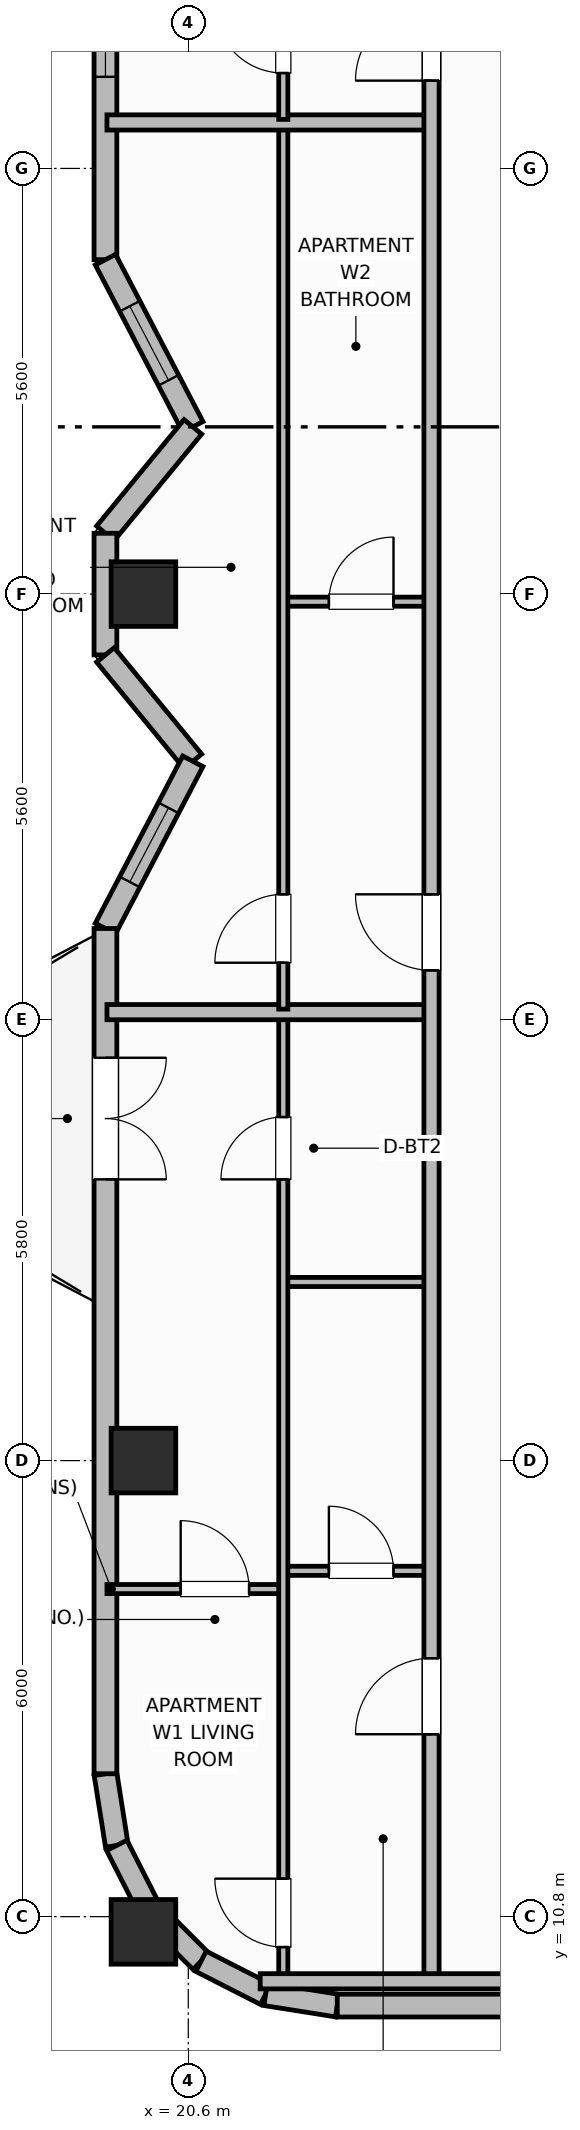
"""IFC4 building model, lengths in metres.
Left out: names, types, materials, properties, quantities, classifications, styles, units other than length and angle.
Written with IfcOpenShell. Run it as: python <this file> out.ifc"""

import sys

from ifc_helpers import new_model, si_unit, direction, frame, frame_2d, origin, origin_2d, place, context, subcontext, project, spatial, rectangle, extrude, element, fill, save


model = new_model("IFC4")
c1 = context("Model", 3, precision=1e-05, world=origin(), true_north=direction((0.0, 1.0)))
c2 = subcontext(c1, "Body", "Model", "MODEL_VIEW")
j1 = project(units=[si_unit("LENGTHUNIT", "METRE"), si_unit("PLANEANGLEUNIT", "RADIAN")], contexts=[c1])
p1 = place(None, origin())
s1 = spatial("IfcSite", under=j1, at=p1, CompositionType="ELEMENT")
p2 = place(p1, origin())
s2 = spatial("IfcBuilding", under=s1, at=p2, CompositionType="ELEMENT")
p3 = place(p2, frame((0.0, 0.0, 240.6)))
s3 = spatial("IfcBuildingStorey", under=s2, at=p3, CompositionType="ELEMENT", Elevation=240.6)
for number, where, z_axis, x_axis in (
    (1, (20.01, 10.6, 0.0), (0.0, 0.0, 1.0), (1.0, 0.0, 0.0)),
    (2, (20.01, 16.8, 0.0), (0.0, 0.0, 1.0), (1.0, 0.0, 0.0)),
    (3, (20.01, 28.2, 0.0), (0.0, 0.0, 1.0), (1.0, 0.0, 0.0)),
):
    element("IfcColumn", number, at=place(p3, frame(where, z_axis=z_axis, x_axis=x_axis)), inside=s3, PredefinedType="COLUMN", context=c2, shape_type="SweptSolid", body=[
        extrude(rectangle(XDim=0.85, YDim=0.85, at=origin_2d()), origin(), (0.0, 0.0, 1.0), 3.7),
    ])
p4 = place(p3, frame((19.51, 12.68, 0.0), z_axis=(0.0, 0.0, 1.0), x_axis=(0.156343617883, -0.987702725088, 0.0)))
e4 = element("IfcWall", 4, at=p4, inside=s3, PredefinedType="SOLIDWALL", context=c2, shape_type="SweptSolid", body=[
    extrude(rectangle(XDim=0.954, YDim=0.3, at=frame_2d((0.477, 0.0))), origin(), (0.0, 0.0, 1.0), 2.73),
])
for number, where, z_axis, x_axis in (
    (5, (19.659, 11.738, 0.0), (0.0, 0.0, 1.0), (0.454, -0.891, 0.0)),
    (6, (20.093, 10.887, 0.0), (0.0, 0.0, 1.0), (0.707, -0.707, 0.0)),
):
    element("IfcWall", number, at=place(p3, frame(where, z_axis=z_axis, x_axis=x_axis)), inside=s3, PredefinedType="SOLIDWALL", context=c2, shape_type="SweptSolid", body=[
        extrude(rectangle(XDim=0.954, YDim=0.3, at=frame_2d((0.477, 0.0))), origin(), (0.0, 0.0, 1.0), 2.73),
    ])
p5 = place(p3, frame((20.767, 10.212, 0.0), z_axis=(0.0, 0.0, 1.0), x_axis=(0.891023873617, -0.45395644796, 0.0)))
e7 = element("IfcWall", 7, at=p5, inside=s3, PredefinedType="SOLIDWALL", context=c2, shape_type="SweptSolid", body=[
    extrude(rectangle(XDim=0.954, YDim=0.3, at=frame_2d((0.477, 0.0))), origin(), (0.0, 0.0, 1.0), 2.73),
])
p6 = place(p3, frame((21.617, 9.779, 0.0), z_axis=(0.0, 0.0, 1.0), x_axis=(0.987669453596, -0.156553666304, 0.0)))
e8 = element("IfcWall", 8, at=p6, inside=s3, PredefinedType="SOLIDWALL", context=c2, shape_type="SweptSolid", body=[
    extrude(rectangle(XDim=0.954, YDim=0.3, at=frame_2d((0.477, 0.0))), origin(), (0.0, 0.0, 1.0), 2.73),
])
p7 = place(p3, frame((22.56, 9.63, 0.0), z_axis=(0.0, 0.0, 1.0), x_axis=(1.0, 0.0, 0.0)))
e9 = element("IfcWall", 9, at=p7, inside=s3, PredefinedType="SOLIDWALL", context=c2, shape_type="SweptSolid", body=[
    extrude(rectangle(XDim=33.28, YDim=0.3, at=frame_2d((16.64, 0.0))), origin(), (0.0, 0.0, 1.0), 2.73),
])
p8 = place(p7, frame((5.08, 0.0, 0.76)))
e10 = element("IfcOpeningElement", 10, at=p8, cuts=e9, PredefinedType="OPENING", context=c2, shape_type="SweptSolid", body=[
    extrude(rectangle(XDim=1.8, YDim=1.85, at=frame_2d((0.9, 0.925))), frame((0.0, 0.16, 0.0), z_axis=(0.0, -1.0, 0.0), x_axis=(1.0, 0.0, 0.0)), (0.0, 0.0, 1.0), 0.32),
])
p9 = place(p7, frame((8.633, 0.0, 0.76)))
e11 = element("IfcOpeningElement", 11, at=p9, cuts=e9, PredefinedType="OPENING", context=c2, shape_type="SweptSolid", body=[
    extrude(rectangle(XDim=1.8, YDim=1.85, at=frame_2d((0.9, 0.925))), frame((0.0, 0.16, 0.0), z_axis=(0.0, -1.0, 0.0), x_axis=(1.0, 0.0, 0.0)), (0.0, 0.0, 1.0), 0.32),
])
p10 = place(p7, frame((15.74, 0.0, 0.76)))
e12 = element("IfcOpeningElement", 12, at=p10, cuts=e9, PredefinedType="OPENING", context=c2, shape_type="SweptSolid", body=[
    extrude(rectangle(XDim=1.8, YDim=1.85, at=frame_2d((0.9, 0.925))), frame((0.0, 0.16, 0.0), z_axis=(0.0, -1.0, 0.0), x_axis=(1.0, 0.0, 0.0)), (0.0, 0.0, 1.0), 0.32),
])
p11 = place(p7, frame((22.847, 0.0, 0.76)))
e13 = element("IfcOpeningElement", 13, at=p11, cuts=e9, PredefinedType="OPENING", context=c2, shape_type="SweptSolid", body=[
    extrude(rectangle(XDim=1.8, YDim=1.85, at=frame_2d((0.9, 0.925))), frame((0.0, 0.16, 0.0), z_axis=(0.0, -1.0, 0.0), x_axis=(1.0, 0.0, 0.0)), (0.0, 0.0, 1.0), 0.32),
])
p12 = place(p7, frame((26.4, 0.0, 0.76)))
e14 = element("IfcOpeningElement", 14, at=p12, cuts=e9, PredefinedType="OPENING", context=c2, shape_type="SweptSolid", body=[
    extrude(rectangle(XDim=1.8, YDim=1.85, at=frame_2d((0.9, 0.925))), frame((0.0, 0.16, 0.0), z_axis=(0.0, -1.0, 0.0), x_axis=(1.0, 0.0, 0.0)), (0.0, 0.0, 1.0), 0.32),
])
p13 = place(p3, frame((19.51, 43.72, 0.0), z_axis=(0.0, 0.0, 1.0), x_axis=(0.0, -1.0, 0.0)))
e15 = element("IfcWall", 15, at=p13, inside=s3, PredefinedType="SOLIDWALL", context=c2, shape_type="SweptSolid", body=[
    extrude(rectangle(XDim=11.12, YDim=0.3, at=frame_2d((5.56, 0.0))), origin(), (0.0, 0.0, 1.0), 2.73),
])
p14 = place(p13, frame((0.16, 0.0, 0.72)))
e16 = element("IfcOpeningElement", 16, at=p14, cuts=e15, PredefinedType="OPENING", context=c2, shape_type="SweptSolid", body=[
    extrude(rectangle(XDim=1.4, YDim=1.85, at=frame_2d((0.7, 0.925))), frame((0.0, 0.16, 0.0), z_axis=(0.0, -1.0, 0.0), x_axis=(1.0, 0.0, 0.0)), (0.0, 0.0, 1.0), 0.32),
])
p15 = place(p13, frame((6.615, 0.0, 0.71)))
e17 = element("IfcOpeningElement", 17, at=p15, cuts=e15, PredefinedType="OPENING", context=c2, shape_type="SweptSolid", body=[
    extrude(rectangle(XDim=2.1, YDim=1.9, at=frame_2d((1.05, 0.95))), frame((0.0, 0.16, 0.0), z_axis=(0.0, -1.0, 0.0), x_axis=(1.0, 0.0, 0.0)), (0.0, 0.0, 1.0), 0.32),
])
p16 = place(p3, frame((19.51, 32.6, 0.0), z_axis=(0.0, 0.0, 1.0), x_axis=(0.463191013929, -0.88625847506, 0.0)))
e18 = element("IfcWall", 18, at=p16, inside=s3, PredefinedType="SOLIDWALL", context=c2, shape_type="SweptSolid", body=[
    extrude(rectangle(XDim=2.483, YDim=0.3, at=frame_2d((1.241, 0.0))), origin(), (0.0, 0.0, 1.0), 2.73),
])
p17 = place(p16, frame((0.691, 0.0, 0.92)))
e19 = element("IfcOpeningElement", 19, at=p17, cuts=e18, PredefinedType="OPENING", context=c2, shape_type="SweptSolid", body=[
    extrude(rectangle(XDim=1.1, YDim=1.65, at=frame_2d((0.55, 0.825))), frame((0.0, 0.16, 0.0), z_axis=(0.0, -1.0, 0.0), x_axis=(1.0, 0.0, 0.0)), (0.0, 0.0, 1.0), 0.32),
])
p18 = place(p3, frame((20.66, 30.4, 0.0), z_axis=(0.0, 0.0, 1.0), x_axis=(-0.634733675645, -0.772730975827, 0.0)))
e20 = element("IfcWall", 20, at=p18, inside=s3, PredefinedType="SOLIDWALL", context=c2, shape_type="SweptSolid", body=[
    extrude(rectangle(XDim=1.812, YDim=0.3, at=frame_2d((0.906, 0.0))), origin(), (0.0, 0.0, 1.0), 2.73),
])
p19 = place(p3, frame((19.51, 29.0, 0.0), z_axis=(0.0, 0.0, 1.0), x_axis=(0.0, -1.0, 0.0)))
e21 = element("IfcWall", 21, at=p19, inside=s3, PredefinedType="SOLIDWALL", context=c2, shape_type="SweptSolid", body=[
    extrude(rectangle(XDim=1.6, YDim=0.3, at=frame_2d((0.8, 0.0))), origin(), (0.0, 0.0, 1.0), 2.73),
])
p20 = place(p3, frame((19.51, 27.4, 0.0), z_axis=(0.0, 0.0, 1.0), x_axis=(0.634733675645, -0.772730975827, 0.0)))
e22 = element("IfcWall", 22, at=p20, inside=s3, PredefinedType="SOLIDWALL", context=c2, shape_type="SweptSolid", body=[
    extrude(rectangle(XDim=1.812, YDim=0.3, at=frame_2d((0.906, 0.0))), origin(), (0.0, 0.0, 1.0), 2.73),
])
p21 = place(p3, frame((20.66, 26.0, 0.0), z_axis=(0.0, 0.0, 1.0), x_axis=(-0.46323138706, -0.886237373418, 0.0)))
e23 = element("IfcWall", 23, at=p21, inside=s3, PredefinedType="SOLIDWALL", context=c2, shape_type="SweptSolid", body=[
    extrude(rectangle(XDim=2.482, YDim=0.3, at=frame_2d((1.241, 0.0))), origin(), (0.0, 0.0, 1.0), 2.73),
])
p22 = place(p21, frame((0.691, 0.0, 0.92)))
e24 = element("IfcOpeningElement", 24, at=p22, cuts=e23, PredefinedType="OPENING", context=c2, shape_type="SweptSolid", body=[
    extrude(rectangle(XDim=1.1, YDim=1.65, at=frame_2d((0.55, 0.825))), frame((0.0, 0.16, 0.0), z_axis=(0.0, -1.0, 0.0), x_axis=(1.0, 0.0, 0.0)), (0.0, 0.0, 1.0), 0.32),
])
p23 = place(p3, frame((19.51, 23.8, 0.0), z_axis=(0.0, 0.0, 1.0), x_axis=(0.0, -1.0, 0.0)))
e25 = element("IfcWall", 25, at=p23, inside=s3, PredefinedType="SOLIDWALL", context=c2, shape_type="SweptSolid", body=[
    extrude(rectangle(XDim=11.12, YDim=0.3, at=frame_2d((5.56, 0.0))), origin(), (0.0, 0.0, 1.0), 2.73),
])
p24 = place(p23, frame((1.7, 0.0, 0.0)))
e26 = element("IfcOpeningElement", 26, at=p24, cuts=e25, PredefinedType="OPENING", context=c2, shape_type="SweptSolid", body=[
    extrude(rectangle(XDim=1.6, YDim=2.1, at=frame_2d((0.8, 1.05))), frame((0.0, 0.16, 0.0), z_axis=(0.0, -1.0, 0.0), x_axis=(1.0, 0.0, 0.0)), (0.0, 0.0, 1.0), 0.32),
])
p25 = place(p3, frame((21.85, 15.35, 0.0), z_axis=(0.0, 0.0, 1.0), x_axis=(1.0, 0.0, 0.0)))
e27 = element("IfcWall", 27, at=p25, inside=s3, PredefinedType="PARTITIONING", context=c2, shape_type="SweptSolid", body=[
    extrude(rectangle(XDim=1.95, YDim=0.12, at=frame_2d((0.975, 0.0))), origin(), (0.0, 0.0, 1.0), 2.56),
])
p26 = place(p25, frame((0.6, 0.0, 0.0)))
e28 = element("IfcOpeningElement", 28, at=p26, cuts=e27, PredefinedType="OPENING", context=c2, shape_type="SweptSolid", body=[
    extrude(rectangle(XDim=0.85, YDim=2.1, at=frame_2d((0.425, 1.05))), frame((0.0, 0.07, 0.0), z_axis=(0.0, -1.0, 0.0), x_axis=(1.0, 0.0, 0.0)), (0.0, 0.0, 1.0), 0.14),
])
p27 = place(p3, frame((21.85, 19.15, 0.0), z_axis=(0.0, 0.0, 1.0), x_axis=(1.0, 0.0, 0.0)))
e29 = element("IfcWall", 29, at=p27, inside=s3, PredefinedType="PARTITIONING", context=c2, shape_type="SweptSolid", body=[
    extrude(rectangle(XDim=1.95, YDim=0.12, at=frame_2d((0.975, 0.0))), origin(), (0.0, 0.0, 1.0), 2.56),
])
p28 = place(p3, frame((19.53, 15.11, 0.0), z_axis=(0.0, 0.0, 1.0), x_axis=(1.0, 0.0, 0.0)))
e30 = element("IfcWall", 30, at=p28, inside=s3, PredefinedType="PARTITIONING", context=c2, shape_type="SweptSolid", body=[
    extrude(rectangle(XDim=2.32, YDim=0.12, at=frame_2d((1.16, 0.0))), origin(), (0.0, 0.0, 1.0), 2.56),
])
p29 = place(p28, frame((0.97, 0.0, 0.0)))
e31 = element("IfcOpeningElement", 31, at=p29, cuts=e30, PredefinedType="OPENING", context=c2, shape_type="SweptSolid", body=[
    extrude(rectangle(XDim=0.9, YDim=2.1, at=frame_2d((0.45, 1.05))), frame((0.0, 0.07, 0.0), z_axis=(0.0, -1.0, 0.0), x_axis=(1.0, 0.0, 0.0)), (0.0, 0.0, 1.0), 0.14),
])
p30 = place(p3, frame((21.85, 9.99, 0.0), z_axis=(0.0, 0.0, 1.0), x_axis=(0.0, 1.0, 0.0)))
e32 = element("IfcWall", 32, at=p30, inside=s3, PredefinedType="PARTITIONING", context=c2, shape_type="SweptSolid", body=[
    extrude(rectangle(XDim=12.67, YDim=0.12, at=frame_2d((6.335, 0.0))), origin(), (0.0, 0.0, 1.0), 2.56),
])
p31 = place(p30, frame((0.41, 0.0, 0.0)))
e33 = element("IfcOpeningElement", 33, at=p31, cuts=e32, PredefinedType="OPENING", context=c2, shape_type="SweptSolid", body=[
    extrude(rectangle(XDim=0.9, YDim=2.1, at=frame_2d((0.45, 1.05))), frame((0.0, 0.07, 0.0), z_axis=(0.0, -1.0, 0.0), x_axis=(1.0, 0.0, 0.0)), (0.0, 0.0, 1.0), 0.14),
])
p32 = place(p30, frame((10.51, 0.0, 0.0)))
e34 = element("IfcOpeningElement", 34, at=p32, cuts=e32, PredefinedType="OPENING", context=c2, shape_type="SweptSolid", body=[
    extrude(rectangle(XDim=0.82, YDim=2.08, at=frame_2d((0.41, 1.04))), frame((0.0, 0.07, 0.0), z_axis=(0.0, -1.0, 0.0), x_axis=(1.0, 0.0, 0.0)), (0.0, 0.0, 1.0), 0.14),
])
p33 = place(p3, frame((19.53, 22.7, 0.0), z_axis=(0.0, 0.0, 1.0), x_axis=(1.0, 0.0, 0.0)))
e35 = element("IfcWall", 35, at=p33, inside=s3, PredefinedType="PARTITIONING", context=c2, shape_type="SweptSolid", body=[
    extrude(rectangle(XDim=4.27, YDim=0.2, at=frame_2d((2.135, 0.0))), origin(), (0.0, 0.0, 1.0), 2.56),
])
p34 = place(p3, frame((21.85, 28.1, 0.0), z_axis=(0.0, 0.0, 1.0), x_axis=(1.0, 0.0, 0.0)))
e36 = element("IfcWall", 36, at=p34, inside=s3, PredefinedType="PARTITIONING", context=c2, shape_type="SweptSolid", body=[
    extrude(rectangle(XDim=1.95, YDim=0.12, at=frame_2d((0.975, 0.0))), origin(), (0.0, 0.0, 1.0), 2.56),
])
p35 = place(p34, frame((0.6, 0.0, 0.0)))
e37 = element("IfcOpeningElement", 37, at=p35, cuts=e36, PredefinedType="OPENING", context=c2, shape_type="SweptSolid", body=[
    extrude(rectangle(XDim=0.85, YDim=2.1, at=frame_2d((0.425, 1.05))), frame((0.0, 0.07, 0.0), z_axis=(0.0, -1.0, 0.0), x_axis=(1.0, 0.0, 0.0)), (0.0, 0.0, 1.0), 0.14),
])
p36 = place(p3, frame((21.85, 22.74, 0.0), z_axis=(0.0, 0.0, 1.0), x_axis=(0.0, 1.0, 0.0)))
e38 = element("IfcWall", 38, at=p36, inside=s3, PredefinedType="PARTITIONING", context=c2, shape_type="SweptSolid", body=[
    extrude(rectangle(XDim=11.625, YDim=0.12, at=frame_2d((5.812, 0.0))), origin(), (0.0, 0.0, 1.0), 2.56),
])
p37 = place(p36, frame((0.61, 0.0, 0.0)))
e39 = element("IfcOpeningElement", 39, at=p37, cuts=e38, PredefinedType="OPENING", context=c2, shape_type="SweptSolid", body=[
    extrude(rectangle(XDim=0.9, YDim=2.1, at=frame_2d((0.45, 1.05))), frame((0.0, 0.07, 0.0), z_axis=(0.0, -1.0, 0.0), x_axis=(1.0, 0.0, 0.0)), (0.0, 0.0, 1.0), 0.14),
])
p38 = place(p3, frame((19.53, 34.405, 0.0), z_axis=(0.0, 0.0, 1.0), x_axis=(1.0, 0.0, 0.0)))
e40 = element("IfcWall", 40, at=p38, inside=s3, PredefinedType="PARTITIONING", context=c2, shape_type="SweptSolid", body=[
    extrude(rectangle(XDim=4.27, YDim=0.2, at=frame_2d((2.135, 0.0))), origin(), (0.0, 0.0, 1.0), 2.56),
])
p39 = place(p3, frame((21.85, 34.445, 0.0), z_axis=(0.0, 0.0, 1.0), x_axis=(0.0, 1.0, 0.0)))
e41 = element("IfcWall", 41, at=p39, inside=s3, PredefinedType="PARTITIONING", context=c2, shape_type="SweptSolid", body=[
    extrude(rectangle(XDim=11.965, YDim=0.12, at=frame_2d((5.982, 0.0))), origin(), (0.0, 0.0, 1.0), 2.56),
])
p40 = place(p39, frame((0.61, 0.0, 0.0)))
e42 = element("IfcOpeningElement", 42, at=p40, cuts=e41, PredefinedType="OPENING", context=c2, shape_type="SweptSolid", body=[
    extrude(rectangle(XDim=0.9, YDim=2.1, at=frame_2d((0.45, 1.05))), frame((0.0, 0.07, 0.0), z_axis=(0.0, -1.0, 0.0), x_axis=(1.0, 0.0, 0.0)), (0.0, 0.0, 1.0), 0.14),
])
p41 = place(p39, frame((10.157, 0.0, 0.0)))
e43 = element("IfcOpeningElement", 43, at=p41, cuts=e41, PredefinedType="OPENING", context=c2, shape_type="SweptSolid", body=[
    extrude(rectangle(XDim=0.82, YDim=2.08, at=frame_2d((0.41, 1.04))), frame((0.0, 0.07, 0.0), z_axis=(0.0, -1.0, 0.0), x_axis=(1.0, 0.0, 0.0)), (0.0, 0.0, 1.0), 0.14),
])
p42 = place(p3, frame((23.8, 9.95, 0.0), z_axis=(0.0, 0.0, 1.0), x_axis=(0.0, 1.0, 0.0)))
e44 = element("IfcWall", 44, at=p42, inside=s3, PredefinedType="PARTITIONING", context=c2, shape_type="SweptSolid", body=[
    extrude(rectangle(XDim=36.5, YDim=0.2, at=frame_2d((18.25, 0.0))), origin(), (0.0, 0.0, 1.0), 2.56),
])
p43 = place(p42, frame((3.25, 0.0, 0.0)))
e45 = element("IfcOpeningElement", 45, at=p43, cuts=e44, PredefinedType="OPENING", context=c2, shape_type="SweptSolid", body=[
    extrude(rectangle(XDim=1.0, YDim=2.15, at=frame_2d((0.5, 1.075))), frame((0.0, 0.11, 0.0), z_axis=(0.0, -1.0, 0.0), x_axis=(1.0, 0.0, 0.0)), (0.0, 0.0, 1.0), 0.22),
])
p44 = place(p42, frame((13.3, 0.0, 0.0)))
e46 = element("IfcOpeningElement", 46, at=p44, cuts=e44, PredefinedType="OPENING", context=c2, shape_type="SweptSolid", body=[
    extrude(rectangle(XDim=1.0, YDim=2.15, at=frame_2d((0.5, 1.075))), frame((0.0, 0.11, 0.0), z_axis=(0.0, -1.0, 0.0), x_axis=(1.0, 0.0, 0.0)), (0.0, 0.0, 1.0), 0.22),
])
p45 = place(p42, frame((25.005, 0.0, 0.0)))
e47 = element("IfcOpeningElement", 47, at=p45, cuts=e44, PredefinedType="OPENING", context=c2, shape_type="SweptSolid", body=[
    extrude(rectangle(XDim=1.0, YDim=2.15, at=frame_2d((0.5, 1.075))), frame((0.0, 0.11, 0.0), z_axis=(0.0, -1.0, 0.0), x_axis=(1.0, 0.0, 0.0)), (0.0, 0.0, 1.0), 0.22),
])
p46 = place(p3, frame((21.546, 9.95, 0.0), z_axis=(0.0, 0.0, 1.0), x_axis=(1.0, 0.0, 0.0)))
e48 = element("IfcWall", 48, at=p46, inside=s3, PredefinedType="PARTITIONING", context=c2, shape_type="SweptSolid", body=[
    extrude(rectangle(XDim=3.754, YDim=0.2, at=frame_2d((1.877, 0.0))), origin(), (0.0, 0.0, 1.0), 2.56),
])
p47 = place(p15, origin())
e49 = element("IfcWindow", 49, at=p47, inside=s3, PartitioningType="SINGLE_PANEL", PredefinedType="WINDOW", context=c2, shape_type="SweptSolid", body=[
    extrude(rectangle(XDim=2.1, YDim=1.9, at=frame_2d((1.05, 0.95))), frame((0.0, 0.03, 0.0), z_axis=(0.0, -1.0, 0.0), x_axis=(1.0, 0.0, 0.0)), (0.0, 0.0, 1.0), 0.06),
])
fill(e17, e49)
p48 = place(p17, origin())
e50 = element("IfcWindow", 50, at=p48, inside=s3, PartitioningType="SINGLE_PANEL", PredefinedType="WINDOW", context=c2, shape_type="SweptSolid", body=[
    extrude(rectangle(XDim=1.1, YDim=1.65, at=frame_2d((0.55, 0.825))), frame((0.0, 0.03, 0.0), z_axis=(0.0, -1.0, 0.0), x_axis=(1.0, 0.0, 0.0)), (0.0, 0.0, 1.0), 0.06),
])
fill(e19, e50)
p49 = place(p22, origin())
e51 = element("IfcWindow", 51, at=p49, inside=s3, PartitioningType="SINGLE_PANEL", PredefinedType="WINDOW", context=c2, shape_type="SweptSolid", body=[
    extrude(rectangle(XDim=1.1, YDim=1.65, at=frame_2d((0.55, 0.825))), frame((0.0, 0.03, 0.0), z_axis=(0.0, -1.0, 0.0), x_axis=(1.0, 0.0, 0.0)), (0.0, 0.0, 1.0), 0.06),
])
fill(e24, e51)
p50 = place(p24, origin())
e52 = element("IfcDoor", 52, at=p50, inside=s3, OperationType="DOUBLE_DOOR_SINGLE_SWING", PredefinedType="DOOR", context=c2, shape_type="SweptSolid", body=[
    extrude(rectangle(XDim=1.6, YDim=2.1, at=frame_2d((0.8, 1.05))), frame((0.0, 0.025, 0.0), z_axis=(0.0, -1.0, 0.0), x_axis=(1.0, 0.0, 0.0)), (0.0, 0.0, 1.0), 0.05),
])
fill(e26, e52)
p51 = place(p26, origin())
e53 = element("IfcDoor", 53, at=p51, inside=s3, OperationType="SINGLE_SWING_LEFT", PredefinedType="DOOR", context=c2, shape_type="SweptSolid", body=[
    extrude(rectangle(XDim=0.85, YDim=2.1, at=frame_2d((0.425, 1.05))), frame((0.0, 0.025, 0.0), z_axis=(0.0, -1.0, 0.0), x_axis=(1.0, 0.0, 0.0)), (0.0, 0.0, 1.0), 0.05),
])
fill(e28, e53)
p52 = place(p29, origin())
e54 = element("IfcDoor", 54, at=p52, inside=s3, OperationType="SINGLE_SWING_LEFT", PredefinedType="DOOR", context=c2, shape_type="SweptSolid", body=[
    extrude(rectangle(XDim=0.9, YDim=2.1, at=frame_2d((0.45, 1.05))), frame((0.0, 0.025, 0.0), z_axis=(0.0, -1.0, 0.0), x_axis=(1.0, 0.0, 0.0)), (0.0, 0.0, 1.0), 0.05),
])
fill(e31, e54)
p53 = place(p31, origin())
e55 = element("IfcDoor", 55, at=p53, inside=s3, OperationType="SINGLE_SWING_RIGHT", PredefinedType="DOOR", context=c2, shape_type="SweptSolid", body=[
    extrude(rectangle(XDim=0.9, YDim=2.1, at=frame_2d((0.45, 1.05))), frame((0.0, 0.025, 0.0), z_axis=(0.0, -1.0, 0.0), x_axis=(1.0, 0.0, 0.0)), (0.0, 0.0, 1.0), 0.05),
])
fill(e33, e55)
p54 = place(p32, origin())
e56 = element("IfcDoor", 56, at=p54, inside=s3, OperationType="SINGLE_SWING_LEFT", PredefinedType="DOOR", context=c2, shape_type="SweptSolid", body=[
    extrude(rectangle(XDim=0.82, YDim=2.08, at=frame_2d((0.41, 1.04))), frame((0.0, 0.025, 0.0), z_axis=(0.0, -1.0, 0.0), x_axis=(1.0, 0.0, 0.0)), (0.0, 0.0, 1.0), 0.05),
])
fill(e34, e56)
p55 = place(p35, origin())
e57 = element("IfcDoor", 57, at=p55, inside=s3, OperationType="SINGLE_SWING_RIGHT", PredefinedType="DOOR", context=c2, shape_type="SweptSolid", body=[
    extrude(rectangle(XDim=0.85, YDim=2.1, at=frame_2d((0.425, 1.05))), frame((0.0, 0.025, 0.0), z_axis=(0.0, -1.0, 0.0), x_axis=(1.0, 0.0, 0.0)), (0.0, 0.0, 1.0), 0.05),
])
fill(e37, e57)
p56 = place(p37, origin())
e58 = element("IfcDoor", 58, at=p56, inside=s3, OperationType="SINGLE_SWING_LEFT", PredefinedType="DOOR", context=c2, shape_type="SweptSolid", body=[
    extrude(rectangle(XDim=0.9, YDim=2.1, at=frame_2d((0.45, 1.05))), frame((0.0, 0.025, 0.0), z_axis=(0.0, -1.0, 0.0), x_axis=(1.0, 0.0, 0.0)), (0.0, 0.0, 1.0), 0.05),
])
fill(e39, e58)
p57 = place(p40, origin())
e59 = element("IfcDoor", 59, at=p57, inside=s3, OperationType="SINGLE_SWING_RIGHT", PredefinedType="DOOR", context=c2, shape_type="SweptSolid", body=[
    extrude(rectangle(XDim=0.9, YDim=2.1, at=frame_2d((0.45, 1.05))), frame((0.0, 0.025, 0.0), z_axis=(0.0, -1.0, 0.0), x_axis=(1.0, 0.0, 0.0)), (0.0, 0.0, 1.0), 0.05),
])
fill(e42, e59)
p58 = place(p43, origin())
e60 = element("IfcDoor", 60, at=p58, inside=s3, OperationType="SINGLE_SWING_LEFT", PredefinedType="DOOR", context=c2, shape_type="SweptSolid", body=[
    extrude(rectangle(XDim=1.0, YDim=2.15, at=frame_2d((0.5, 1.075))), frame((0.0, 0.025, 0.0), z_axis=(0.0, -1.0, 0.0), x_axis=(1.0, 0.0, 0.0)), (0.0, 0.0, 1.0), 0.05),
])
fill(e45, e60)
p59 = place(p44, origin())
e61 = element("IfcDoor", 61, at=p59, inside=s3, OperationType="SINGLE_SWING_RIGHT", PredefinedType="DOOR", context=c2, shape_type="SweptSolid", body=[
    extrude(rectangle(XDim=1.0, YDim=2.15, at=frame_2d((0.5, 1.075))), frame((0.0, 0.025, 0.0), z_axis=(0.0, -1.0, 0.0), x_axis=(1.0, 0.0, 0.0)), (0.0, 0.0, 1.0), 0.05),
])
fill(e46, e61)
p60 = place(p45, origin())
e62 = element("IfcDoor", 62, at=p60, inside=s3, OperationType="SINGLE_SWING_LEFT", PredefinedType="DOOR", context=c2, shape_type="SweptSolid", body=[
    extrude(rectangle(XDim=1.0, YDim=2.15, at=frame_2d((0.5, 1.075))), frame((0.0, 0.025, 0.0), z_axis=(0.0, -1.0, 0.0), x_axis=(1.0, 0.0, 0.0)), (0.0, 0.0, 1.0), 0.05),
])
fill(e47, e62)
save(model, sys.argv[1])
